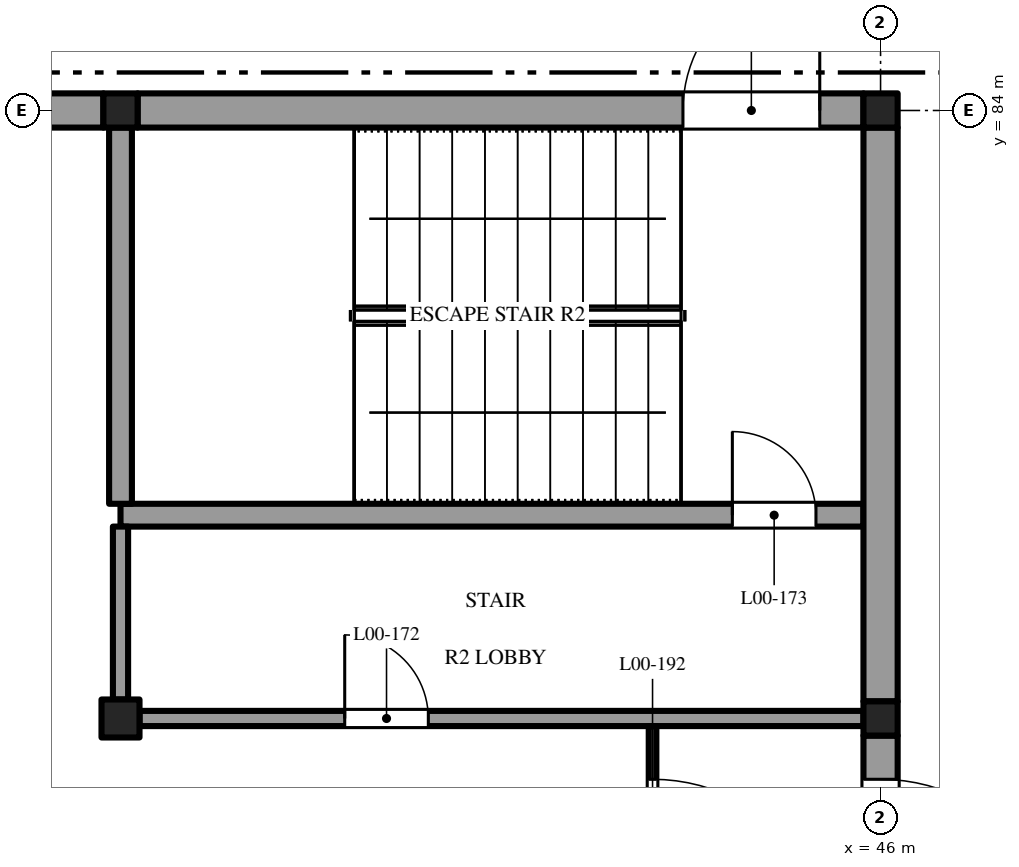
"""IFC4 building model, lengths in metres.
Left out: names, types, materials, properties, quantities, classifications, styles, units other than length and angle.
Written with IfcOpenShell. Run it as: python <this file> out.ifc"""

import sys

from ifc_helpers import new_model, si_unit, direction, frame, frame_2d, origin, origin_2d, place, context, subcontext, project, spatial, rectangle, extrude, element, fill, save


model = new_model("IFC4")
c1 = context("Model", 3, precision=1e-05, world=origin(), true_north=direction((0.0, 1.0)))
c2 = subcontext(c1, "Body", "Model", "MODEL_VIEW")
j1 = project(units=[si_unit("LENGTHUNIT", "METRE"), si_unit("PLANEANGLEUNIT", "RADIAN")], contexts=[c1])
p1 = place(None, origin())
s1 = spatial("IfcSite", under=j1, at=p1, CompositionType="ELEMENT")
p2 = place(p1, origin())
s2 = spatial("IfcBuilding", under=s1, at=p2, CompositionType="ELEMENT")
p3 = place(p2, origin())
s3 = spatial("IfcBuildingStorey", under=s2, at=p3, CompositionType="ELEMENT", Elevation=0.0)
p4 = place(p3, frame((36.0, 76.0, -0.4), z_axis=(0.0, 0.0, 1.0), x_axis=(1.0, 0.0, 0.0)))
e1 = element("IfcColumn", 1, at=p4, inside=s3, PredefinedType="COLUMN", context=c2, shape_type="SweptSolid", body=[
    extrude(rectangle(XDim=0.5, YDim=0.5, at=origin_2d()), origin(), (0.0, 0.0, 1.0), 7.6),
])
for number, where, z_axis, x_axis in (
    (2, (36.0, 84.0, -0.4), (0.0, 0.0, 1.0), (1.0, 0.0, 0.0)),
    (3, (46.0, 76.0, -0.4), (0.0, 0.0, 1.0), (1.0, 0.0, 0.0)),
    (4, (46.0, 84.0, -0.4), (0.0, 0.0, 1.0), (1.0, 0.0, 0.0)),
):
    element("IfcColumn", number, at=place(p3, frame(where, z_axis=z_axis, x_axis=x_axis)), inside=s3, PredefinedType="COLUMN", context=c2, shape_type="SweptSolid", body=[
        extrude(rectangle(XDim=0.45, YDim=0.45, at=origin_2d()), origin(), (0.0, 0.0, 1.0), 7.6),
    ])
p5 = place(p3, frame((36.25, 76.0, 0.0), z_axis=(0.0, 0.0, 1.0), x_axis=(1.0, 0.0, 0.0)))
e5 = element("IfcWall", 5, at=p5, inside=s3, PredefinedType="SOLIDWALL", context=c2, shape_type="SweptSolid", body=[
    extrude(rectangle(XDim=9.525, YDim=0.2, at=frame_2d((4.762, 0.0))), origin(), (0.0, 0.0, 1.0), 6.85),
])
p6 = place(p5, frame((2.7, 0.0, 0.0)))
e6 = element("IfcOpeningElement", 6, at=p6, cuts=e5, PredefinedType="OPENING", context=c2, shape_type="SweptSolid", body=[
    extrude(rectangle(XDim=1.1, YDim=2.1, at=frame_2d((0.55, 1.05))), frame((0.0, 0.11, 0.0), z_axis=(0.0, -1.0, 0.0), x_axis=(1.0, 0.0, 0.0)), (0.0, 0.0, 1.0), 0.22),
])
p7 = place(p3, frame((36.0, 78.675, 0.0), z_axis=(0.0, 0.0, 1.0), x_axis=(1.0, 0.0, 0.0)))
e7 = element("IfcWall", 7, at=p7, inside=s3, PredefinedType="SHEAR", context=c2, shape_type="SweptSolid", body=[
    extrude(rectangle(XDim=9.775, YDim=0.3, at=frame_2d((4.887, 0.0))), origin(), (0.0, 0.0, 1.0), 6.85),
])
p8 = place(p7, frame((8.05, 0.0, 0.0)))
e8 = element("IfcOpeningElement", 8, at=p8, cuts=e7, PredefinedType="OPENING", context=c2, shape_type="SweptSolid", body=[
    extrude(rectangle(XDim=1.1, YDim=2.1, at=frame_2d((0.55, 1.05))), frame((0.0, 0.16, 0.0), z_axis=(0.0, -1.0, 0.0), x_axis=(1.0, 0.0, 0.0)), (0.0, 0.0, 1.0), 0.32),
])
p9 = place(p3, frame((35.775, 84.0, 0.0), z_axis=(0.0, 0.0, 1.0), x_axis=(-1.0, 0.0, 0.0)))
e9 = element("IfcWall", 9, at=p9, inside=s3, PredefinedType="SOLIDWALL", context=c2, shape_type="SweptSolid", body=[
    extrude(rectangle(XDim=9.55, YDim=0.45, at=frame_2d((4.775, 0.0))), origin(), (0.0, 0.0, 1.0), 6.85),
])
p10 = place(p9, frame((5.775, 0.0, 1.0)))
e10 = element("IfcOpeningElement", 10, at=p10, cuts=e9, PredefinedType="OPENING", context=c2, shape_type="SweptSolid", body=[
    extrude(rectangle(XDim=3.0, YDim=4.0, at=frame_2d((1.5, 2.0))), frame((0.0, 0.235, 0.0), z_axis=(0.0, -1.0, 0.0), x_axis=(1.0, 0.0, 0.0)), (0.0, 0.0, 1.0), 0.47),
])
p11 = place(p9, frame((0.775, 0.0, 1.0)))
e11 = element("IfcOpeningElement", 11, at=p11, cuts=e9, PredefinedType="OPENING", context=c2, shape_type="SweptSolid", body=[
    extrude(rectangle(XDim=3.0, YDim=4.0, at=frame_2d((1.5, 2.0))), frame((0.0, 0.235, 0.0), z_axis=(0.0, -1.0, 0.0), x_axis=(1.0, 0.0, 0.0)), (0.0, 0.0, 1.0), 0.47),
])
p12 = place(p3, frame((45.775, 84.0, 0.0), z_axis=(0.0, 0.0, 1.0), x_axis=(-1.0, 0.0, 0.0)))
e12 = element("IfcWall", 12, at=p12, inside=s3, PredefinedType="SOLIDWALL", context=c2, shape_type="SweptSolid", body=[
    extrude(rectangle(XDim=9.55, YDim=0.45, at=frame_2d((4.775, 0.0))), origin(), (0.0, 0.0, 1.0), 6.85),
])
p13 = place(p12, frame((0.575, 0.0, 0.0)))
e13 = element("IfcOpeningElement", 13, at=p13, cuts=e12, PredefinedType="OPENING", context=c2, shape_type="SweptSolid", body=[
    extrude(rectangle(XDim=1.8, YDim=2.1, at=frame_2d((0.9, 1.05))), frame((0.0, 0.235, 0.0), z_axis=(0.0, -1.0, 0.0), x_axis=(1.0, 0.0, 0.0)), (0.0, 0.0, 1.0), 0.47),
])
p14 = place(p3, frame((36.0, 76.25, 0.0), z_axis=(0.0, 0.0, 1.0), x_axis=(0.0, 1.0, 0.0)))
e14 = element("IfcWall", 14, at=p14, inside=s3, PredefinedType="SOLIDWALL", context=c2, shape_type="SweptSolid", body=[
    extrude(rectangle(XDim=2.275, YDim=0.2, at=frame_2d((1.137, 0.0))), origin(), (0.0, 0.0, 1.0), 6.85),
])
p15 = place(p3, frame((36.0, 78.825, 0.0), z_axis=(0.0, 0.0, 1.0), x_axis=(0.0, 1.0, 0.0)))
e15 = element("IfcWall", 15, at=p15, inside=s3, PredefinedType="SHEAR", context=c2, shape_type="SweptSolid", body=[
    extrude(rectangle(XDim=4.95, YDim=0.3, at=frame_2d((2.475, 0.0))), origin(), (0.0, 0.0, 1.0), 6.85),
])
p16 = place(p3, frame((43.0, 72.05, 0.0), z_axis=(0.0, 0.0, 1.0), x_axis=(0.0, 1.0, 0.0)))
e16 = element("IfcWall", 16, at=p16, inside=s3, PredefinedType="PARTITIONING", context=c2, shape_type="SweptSolid", body=[
    extrude(rectangle(XDim=3.85, YDim=0.1, at=frame_2d((1.925, 0.0))), origin(), (0.0, 0.0, 1.0), 6.85),
])
p17 = place(p16, frame((0.75, 0.0, 0.0)))
e17 = element("IfcOpeningElement", 17, at=p17, cuts=e16, PredefinedType="OPENING", context=c2, shape_type="SweptSolid", body=[
    extrude(rectangle(XDim=2.4, YDim=2.4, at=frame_2d((1.2, 1.2))), frame((0.0, 0.06, 0.0), z_axis=(0.0, -1.0, 0.0), x_axis=(1.0, 0.0, 0.0)), (0.0, 0.0, 1.0), 0.12),
])
p18 = place(p3, frame((46.0, 68.225, 0.0), z_axis=(0.0, 0.0, 1.0), x_axis=(0.0, 1.0, 0.0)))
e18 = element("IfcWall", 18, at=p18, inside=s3, PredefinedType="SOLIDWALL", context=c2, shape_type="SweptSolid", body=[
    extrude(rectangle(XDim=7.55, YDim=0.45, at=frame_2d((3.775, 0.0))), origin(), (0.0, 0.0, 1.0), 6.85),
])
p19 = place(p18, frame((4.575, 0.0, 0.0)))
e19 = element("IfcOpeningElement", 19, at=p19, cuts=e18, PredefinedType="OPENING", context=c2, shape_type="SweptSolid", body=[
    extrude(rectangle(XDim=2.4, YDim=2.4, at=frame_2d((1.2, 1.2))), frame((0.0, 0.235, 0.0), z_axis=(0.0, -1.0, 0.0), x_axis=(1.0, 0.0, 0.0)), (0.0, 0.0, 1.0), 0.47),
])
p20 = place(p18, frame((0.275, 0.0, 1.0)))
e20 = element("IfcOpeningElement", 20, at=p20, cuts=e18, PredefinedType="OPENING", context=c2, shape_type="SweptSolid", body=[
    extrude(rectangle(XDim=3.0, YDim=4.0, at=frame_2d((1.5, 2.0))), frame((0.0, 0.235, 0.0), z_axis=(0.0, -1.0, 0.0), x_axis=(1.0, 0.0, 0.0)), (0.0, 0.0, 1.0), 0.47),
])
p21 = place(p3, frame((46.0, 76.225, 0.0), z_axis=(0.0, 0.0, 1.0), x_axis=(0.0, 1.0, 0.0)))
e21 = element("IfcWall", 21, at=p21, inside=s3, PredefinedType="SOLIDWALL", context=c2, shape_type="SweptSolid", body=[
    extrude(rectangle(XDim=7.55, YDim=0.45, at=frame_2d((3.775, 0.0))), origin(), (0.0, 0.0, 1.0), 6.85),
])
p22 = place(p6, origin())
e22 = element("IfcDoor", 22, at=p22, inside=s3, OperationType="SINGLE_SWING_LEFT", PredefinedType="DOOR", context=c2, shape_type="SweptSolid", body=[
    extrude(rectangle(XDim=1.1, YDim=2.1, at=frame_2d((0.55, 1.05))), frame((0.0, 0.025, 0.0), z_axis=(0.0, -1.0, 0.0), x_axis=(1.0, 0.0, 0.0)), (0.0, 0.0, 1.0), 0.05),
])
fill(e6, e22)
p23 = place(p8, origin())
e23 = element("IfcDoor", 23, at=p23, inside=s3, OperationType="SINGLE_SWING_RIGHT", PredefinedType="DOOR", context=c2, shape_type="SweptSolid", body=[
    extrude(rectangle(XDim=1.1, YDim=2.1, at=frame_2d((0.55, 1.05))), frame((0.0, 0.025, 0.0), z_axis=(0.0, -1.0, 0.0), x_axis=(1.0, 0.0, 0.0)), (0.0, 0.0, 1.0), 0.05),
])
fill(e8, e23)
p24 = place(p17, frame((2.4, 0.0, 0.0), z_axis=(0.0, 0.0, 1.0), x_axis=(-1.0, 0.0, 0.0)))
e24 = element("IfcDoor", 24, at=p24, inside=s3, OperationType="DOUBLE_DOOR_SINGLE_SWING", PredefinedType="DOOR", context=c2, shape_type="SweptSolid", body=[
    extrude(rectangle(XDim=2.4, YDim=2.4, at=frame_2d((1.2, 1.2))), frame((0.0, 0.025, 0.0), z_axis=(0.0, -1.0, 0.0), x_axis=(1.0, 0.0, 0.0)), (0.0, 0.0, 1.0), 0.05),
])
fill(e17, e24)
p25 = place(p19, frame((2.4, 0.0, 0.0), z_axis=(0.0, 0.0, 1.0), x_axis=(-1.0, 0.0, 0.0)))
e25 = element("IfcDoor", 25, at=p25, inside=s3, OperationType="DOUBLE_DOOR_SINGLE_SWING", PredefinedType="DOOR", context=c2, shape_type="SweptSolid", body=[
    extrude(rectangle(XDim=2.4, YDim=2.4, at=frame_2d((1.2, 1.2))), frame((0.0, 0.025, 0.0), z_axis=(0.0, -1.0, 0.0), x_axis=(1.0, 0.0, 0.0)), (0.0, 0.0, 1.0), 0.05),
])
fill(e19, e25)
p26 = place(p13, frame((1.8, 0.0, 0.0), z_axis=(0.0, 0.0, 1.0), x_axis=(-1.0, 0.0, 0.0)))
e26 = element("IfcDoor", 26, at=p26, inside=s3, OperationType="DOUBLE_DOOR_SINGLE_SWING", PredefinedType="DOOR", context=c2, shape_type="SweptSolid", body=[
    extrude(rectangle(XDim=1.8, YDim=2.1, at=frame_2d((0.9, 1.05))), frame((0.0, 0.025, 0.0), z_axis=(0.0, -1.0, 0.0), x_axis=(1.0, 0.0, 0.0)), (0.0, 0.0, 1.0), 0.05),
])
fill(e13, e26)
save(model, sys.argv[1])
